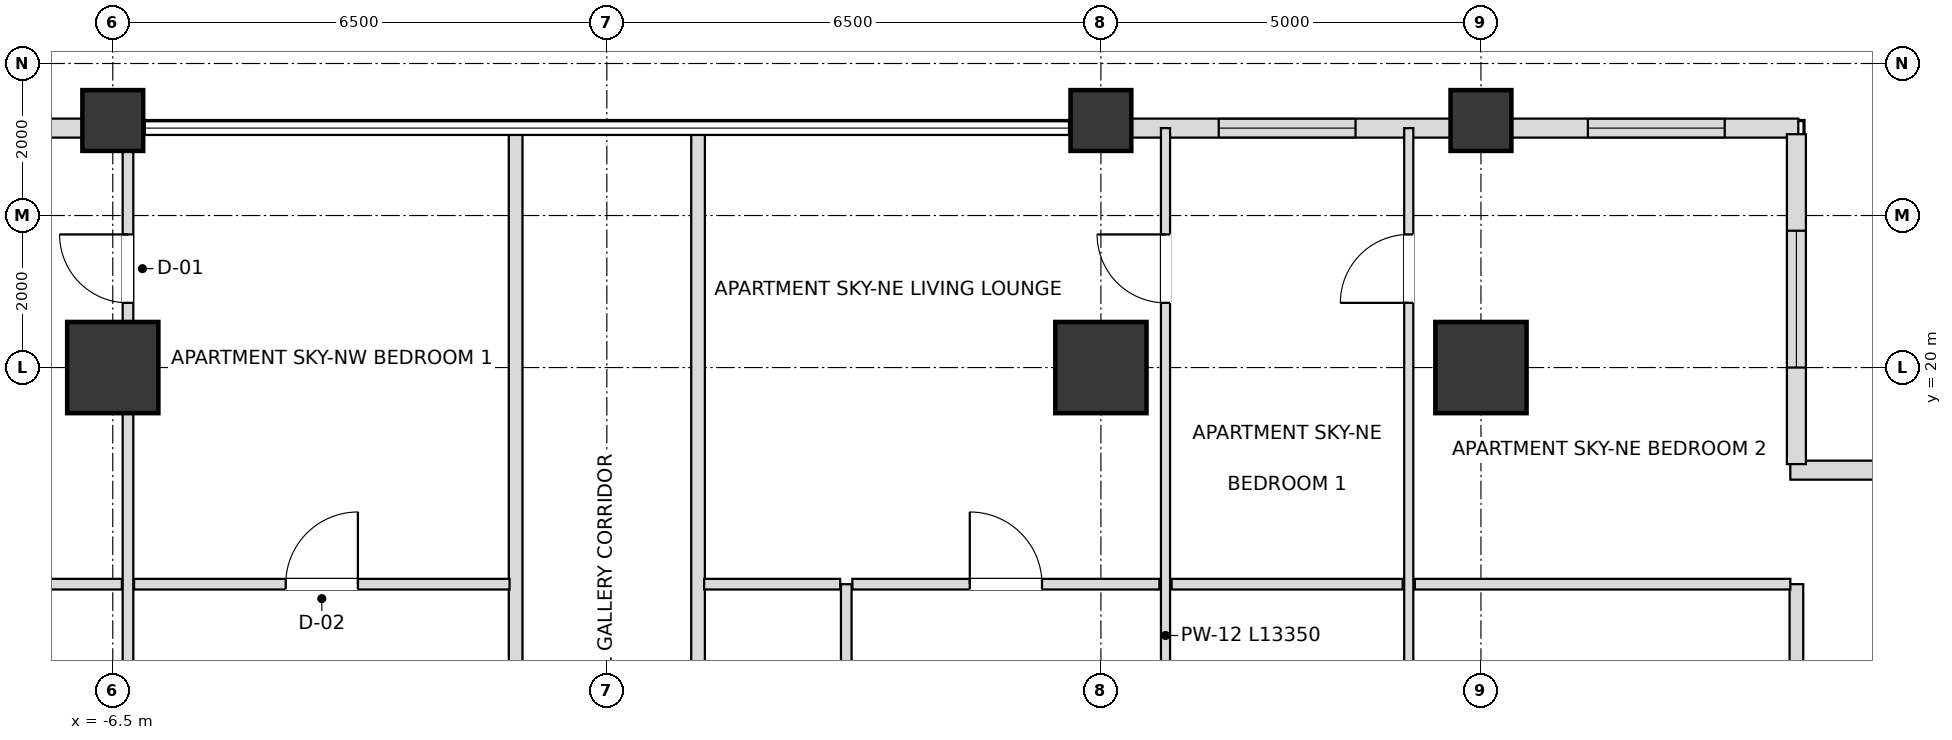
"""IFC4 building model, lengths in metres.
Left out: names, types, materials, properties, quantities, classifications, styles, units other than length and angle.
Written with IfcOpenShell. Run it as: python <this file> out.ifc"""

import sys

from ifc_helpers import new_model, si_unit, direction, frame, frame_2d, origin, origin_2d, place, context, subcontext, project, spatial, rectangle, extrude, element, fill, save


model = new_model("IFC4")
c1 = context("Model", 3, precision=1e-05, world=origin(), true_north=direction((0.0, 1.0)))
c2 = subcontext(c1, "Body", "Model", "MODEL_VIEW")
j1 = project(units=[si_unit("LENGTHUNIT", "METRE"), si_unit("PLANEANGLEUNIT", "RADIAN")], contexts=[c1])
p1 = place(None, origin())
s1 = spatial("IfcSite", under=j1, at=p1, CompositionType="ELEMENT")
p2 = place(p1, origin())
s2 = spatial("IfcBuilding", under=s1, at=p2, CompositionType="ELEMENT")
p3 = place(p2, frame((0.0, 0.0, 125.1)))
s3 = spatial("IfcBuildingStorey", under=s2, at=p3, CompositionType="ELEMENT", Elevation=125.1)
for number, where, z_axis, x_axis in (
    (1, (11.5, 20.0, 0.0), (0.0, 0.0, 1.0), (1.0, 0.0, 0.0)),
    (2, (6.5, 20.0, 0.0), (0.0, 0.0, 1.0), (1.0, 0.0, 0.0)),
    (3, (-6.5, 20.0, 0.0), (0.0, 0.0, 1.0), (1.0, 0.0, 0.0)),
):
    element("IfcColumn", number, at=place(p3, frame(where, z_axis=z_axis, x_axis=x_axis)), inside=s3, PredefinedType="USERDEFINED", context=c2, shape_type="SweptSolid", body=[
        extrude(rectangle(XDim=1.2, YDim=1.2, at=origin_2d()), origin(), (0.0, 0.0, 1.0), 4.5),
    ])
for number, where, z_axis, x_axis in (
    (4, (-6.5, 23.25, 0.0), (0.0, 0.0, 1.0), (1.0, 0.0, 0.0)),
    (5, (6.5, 23.25, 0.0), (0.0, 0.0, 1.0), (1.0, 0.0, 0.0)),
    (6, (11.5, 23.25, 0.0), (0.0, 0.0, 1.0), (1.0, 0.0, 0.0)),
):
    element("IfcColumn", number, at=place(p3, frame(where, z_axis=z_axis, x_axis=x_axis)), inside=s3, PredefinedType="COLUMN", context=c2, shape_type="SweptSolid", body=[
        extrude(rectangle(XDim=0.8, YDim=0.8, at=origin_2d()), origin(), (0.0, 0.0, 1.0), 4.5),
    ])
p4 = place(p3, frame((15.675, 23.15, 0.0), z_axis=(0.0, 0.0, 1.0), x_axis=(-1.0, 0.0, 0.0)))
e7 = element("IfcWall", 7, at=p4, inside=s3, PredefinedType="SOLIDWALL", context=c2, shape_type="SweptSolid", body=[
    extrude(rectangle(XDim=3.78, YDim=0.25, at=frame_2d((1.89, 0.0))), origin(), (0.0, 0.0, 1.0), 3.636),
])
p5 = place(p4, frame((0.968, 0.0, 0.72)))
e8 = element("IfcOpeningElement", 8, at=p5, cuts=e7, PredefinedType="OPENING", context=c2, shape_type="SweptSolid", body=[
    extrude(rectangle(XDim=1.8, YDim=1.68, at=frame_2d((0.9, 0.84))), frame((0.0, 0.135, 0.0), z_axis=(0.0, -1.0, 0.0), x_axis=(1.0, 0.0, 0.0)), (0.0, 0.0, 1.0), 0.27),
])
p6 = place(p3, frame((11.105, 23.15, 0.0), z_axis=(0.0, 0.0, 1.0), x_axis=(-1.0, 0.0, 0.0)))
e9 = element("IfcWall", 9, at=p6, inside=s3, PredefinedType="SOLIDWALL", context=c2, shape_type="SweptSolid", body=[
    extrude(rectangle(XDim=4.21, YDim=0.25, at=frame_2d((2.105, 0.0))), origin(), (0.0, 0.0, 1.0), 3.636),
])
p7 = place(p6, frame((1.255, 0.0, 0.72)))
e10 = element("IfcOpeningElement", 10, at=p7, cuts=e9, PredefinedType="OPENING", context=c2, shape_type="SweptSolid", body=[
    extrude(rectangle(XDim=1.8, YDim=1.68, at=frame_2d((0.9, 0.84))), frame((0.0, 0.135, 0.0), z_axis=(0.0, -1.0, 0.0), x_axis=(1.0, 0.0, 0.0)), (0.0, 0.0, 1.0), 0.27),
])
p8 = place(p3, frame((-6.895, 23.15, 0.0), z_axis=(0.0, 0.0, 1.0), x_axis=(-1.0, 0.0, 0.0)))
e11 = element("IfcWall", 11, at=p8, inside=s3, PredefinedType="SOLIDWALL", context=c2, shape_type="SweptSolid", body=[
    extrude(rectangle(XDim=4.21, YDim=0.25, at=frame_2d((2.105, 0.0))), origin(), (0.0, 0.0, 1.0), 3.636),
])
p9 = place(p8, frame((1.205, 0.0, 0.72)))
e12 = element("IfcOpeningElement", 12, at=p9, cuts=e11, PredefinedType="OPENING", context=c2, shape_type="SweptSolid", body=[
    extrude(rectangle(XDim=1.8, YDim=1.68, at=frame_2d((0.9, 0.84))), frame((0.0, 0.135, 0.0), z_axis=(0.0, -1.0, 0.0), x_axis=(1.0, 0.0, 0.0)), (0.0, 0.0, 1.0), 0.27),
])
p10 = place(p3, frame((20.23, 18.65, 0.0), z_axis=(0.0, 0.0, 1.0), x_axis=(-1.0, 0.0, 0.0)))
e13 = element("IfcWall", 13, at=p10, inside=s3, PredefinedType="SOLIDWALL", context=c2, shape_type="SweptSolid", body=[
    extrude(rectangle(XDim=4.66, YDim=0.25, at=frame_2d((2.33, 0.0))), origin(), (0.0, 0.0, 1.0), 3.636),
])
p11 = place(p10, frame((1.43, 0.0, 0.72)))
e14 = element("IfcOpeningElement", 14, at=p11, cuts=e13, PredefinedType="OPENING", context=c2, shape_type="SweptSolid", body=[
    extrude(rectangle(XDim=1.8, YDim=1.68, at=frame_2d((0.9, 0.84))), frame((0.0, 0.135, 0.0), z_axis=(0.0, -1.0, 0.0), x_axis=(1.0, 0.0, 0.0)), (0.0, 0.0, 1.0), 0.27),
])
p12 = place(p3, frame((15.65, 18.73, 0.0), z_axis=(0.0, 0.0, 1.0), x_axis=(0.0, 1.0, 0.0)))
e15 = element("IfcWall", 15, at=p12, inside=s3, PredefinedType="SOLIDWALL", context=c2, shape_type="SweptSolid", body=[
    extrude(rectangle(XDim=4.34, YDim=0.25, at=frame_2d((2.17, 0.0))), origin(), (0.0, 0.0, 1.0), 3.636),
])
p13 = place(p12, frame((1.27, 0.0, 0.72)))
e16 = element("IfcOpeningElement", 16, at=p13, cuts=e15, PredefinedType="OPENING", context=c2, shape_type="SweptSolid", body=[
    extrude(rectangle(XDim=1.8, YDim=1.68, at=frame_2d((0.9, 0.84))), frame((0.0, 0.135, 0.0), z_axis=(0.0, -1.0, 0.0), x_axis=(1.0, 0.0, 0.0)), (0.0, 0.0, 1.0), 0.27),
])
p14 = place(p3, frame((-6.3, 9.8, 0.0), z_axis=(0.0, 0.0, 1.0), x_axis=(0.0, 1.0, 0.0)))
e17 = element("IfcWall", 17, at=p14, inside=s3, PredefinedType="PARTITIONING", context=c2, shape_type="SweptSolid", body=[
    extrude(rectangle(XDim=13.35, YDim=0.14, at=frame_2d((6.675, 0.0))), origin(), (0.0, 0.0, 1.0), 3.716),
])
p15 = place(p14, frame((11.051, 0.0, 0.0)))
e18 = element("IfcOpeningElement", 18, at=p15, cuts=e17, PredefinedType="OPENING", context=c2, shape_type="SweptSolid", body=[
    extrude(rectangle(XDim=0.9, YDim=2.1, at=frame_2d((0.45, 1.05))), frame((0.0, 0.08, 0.0), z_axis=(0.0, -1.0, 0.0), x_axis=(1.0, 0.0, 0.0)), (0.0, 0.0, 1.0), 0.16),
])
for number, where, z_axis, x_axis in (
    (19, (-1.2, 9.8, 0.0), (0.0, 0.0, 1.0), (0.0, 1.0, 0.0)),
    (20, (1.2, 9.8, 0.0), (0.0, 0.0, 1.0), (0.0, 1.0, 0.0)),
):
    element("IfcWall", number, at=place(p3, frame(where, z_axis=z_axis, x_axis=x_axis)), inside=s3, PredefinedType="PARTITIONING", context=c2, shape_type="SweptSolid", body=[
        extrude(rectangle(XDim=13.35, YDim=0.18, at=frame_2d((6.675, 0.0))), origin(), (0.0, 0.0, 1.0), 3.716),
    ])
p16 = place(p3, frame((3.15, 9.8, 0.0), z_axis=(0.0, 0.0, 1.0), x_axis=(0.0, 1.0, 0.0)))
e21 = element("IfcWall", 21, at=p16, inside=s3, PredefinedType="PARTITIONING", context=c2, shape_type="SweptSolid", body=[
    extrude(rectangle(XDim=7.35, YDim=0.14, at=frame_2d((3.675, 0.0))), origin(), (0.0, 0.0, 1.0), 4.28),
])
p17 = place(p16, frame((3.22, 0.0, 0.0)))
e22 = element("IfcOpeningElement", 22, at=p17, cuts=e21, PredefinedType="OPENING", context=c2, shape_type="SweptSolid", body=[
    extrude(rectangle(XDim=0.9, YDim=2.1, at=frame_2d((0.45, 1.05))), frame((0.0, 0.08, 0.0), z_axis=(0.0, -1.0, 0.0), x_axis=(1.0, 0.0, 0.0)), (0.0, 0.0, 1.0), 0.16),
])
p18 = place(p3, frame((7.35, 9.8, 0.0), z_axis=(0.0, 0.0, 1.0), x_axis=(0.0, 1.0, 0.0)))
e23 = element("IfcWall", 23, at=p18, inside=s3, PredefinedType="PARTITIONING", context=c2, shape_type="SweptSolid", body=[
    extrude(rectangle(XDim=13.35, YDim=0.12, at=frame_2d((6.675, 0.0))), origin(), (0.0, 0.0, 1.0), 3.716),
])
p19 = place(p18, frame((3.195, 0.0, 0.0)))
e24 = element("IfcOpeningElement", 24, at=p19, cuts=e23, PredefinedType="OPENING", context=c2, shape_type="SweptSolid", body=[
    extrude(rectangle(XDim=0.95, YDim=2.1, at=frame_2d((0.475, 1.05))), frame((0.0, 0.07, 0.0), z_axis=(0.0, -1.0, 0.0), x_axis=(1.0, 0.0, 0.0)), (0.0, 0.0, 1.0), 0.14),
])
p20 = place(p18, frame((11.051, 0.0, 0.0)))
e25 = element("IfcOpeningElement", 25, at=p20, cuts=e23, PredefinedType="OPENING", context=c2, shape_type="SweptSolid", body=[
    extrude(rectangle(XDim=0.9, YDim=2.1, at=frame_2d((0.45, 1.05))), frame((0.0, 0.07, 0.0), z_axis=(0.0, -1.0, 0.0), x_axis=(1.0, 0.0, 0.0)), (0.0, 0.0, 1.0), 0.14),
])
p21 = place(p3, frame((10.55, 9.8, 0.0), z_axis=(0.0, 0.0, 1.0), x_axis=(0.0, 1.0, 0.0)))
e26 = element("IfcWall", 26, at=p21, inside=s3, PredefinedType="PARTITIONING", context=c2, shape_type="SweptSolid", body=[
    extrude(rectangle(XDim=13.35, YDim=0.12, at=frame_2d((6.675, 0.0))), origin(), (0.0, 0.0, 1.0), 3.716),
])
p22 = place(p21, frame((3.713, 0.0, 0.0)))
e27 = element("IfcOpeningElement", 27, at=p22, cuts=e26, PredefinedType="OPENING", context=c2, shape_type="SweptSolid", body=[
    extrude(rectangle(XDim=0.95, YDim=2.1, at=frame_2d((0.475, 1.05))), frame((0.0, 0.07, 0.0), z_axis=(0.0, -1.0, 0.0), x_axis=(1.0, 0.0, 0.0)), (0.0, 0.0, 1.0), 0.14),
])
p23 = place(p21, frame((11.051, 0.0, 0.0)))
e28 = element("IfcOpeningElement", 28, at=p23, cuts=e26, PredefinedType="OPENING", context=c2, shape_type="SweptSolid", body=[
    extrude(rectangle(XDim=0.9, YDim=2.1, at=frame_2d((0.45, 1.05))), frame((0.0, 0.07, 0.0), z_axis=(0.0, -1.0, 0.0), x_axis=(1.0, 0.0, 0.0)), (0.0, 0.0, 1.0), 0.14),
])
p24 = place(p3, frame((15.65, 9.8, 0.0), z_axis=(0.0, 0.0, 1.0), x_axis=(0.0, 1.0, 0.0)))
e29 = element("IfcWall", 29, at=p24, inside=s3, PredefinedType="PARTITIONING", context=c2, shape_type="SweptSolid", body=[
    extrude(rectangle(XDim=7.35, YDim=0.18, at=frame_2d((3.675, 0.0))), origin(), (0.0, 0.0, 1.0), 3.636),
])
p25 = place(p3, frame((-8.17, 17.15, 0.0), z_axis=(0.0, 0.0, 1.0), x_axis=(1.0, 0.0, 0.0)))
e30 = element("IfcWall", 30, at=p25, inside=s3, PredefinedType="PARTITIONING", context=c2, shape_type="SweptSolid", body=[
    extrude(rectangle(XDim=1.79, YDim=0.14, at=frame_2d((0.895, 0.0))), origin(), (0.0, 0.0, 1.0), 3.716),
])
p26 = place(p3, frame((-6.22, 17.15, 0.0), z_axis=(0.0, 0.0, 1.0), x_axis=(1.0, 0.0, 0.0)))
e31 = element("IfcWall", 31, at=p26, inside=s3, PredefinedType="PARTITIONING", context=c2, shape_type="SweptSolid", body=[
    extrude(rectangle(XDim=4.94, YDim=0.14, at=frame_2d((2.47, 0.0))), origin(), (0.0, 0.0, 1.0), 4.28),
])
p27 = place(p26, frame((1.995, 0.0, 0.0)))
e32 = element("IfcOpeningElement", 32, at=p27, cuts=e31, PredefinedType="OPENING", context=c2, shape_type="SweptSolid", body=[
    extrude(rectangle(XDim=0.95, YDim=2.1, at=frame_2d((0.475, 1.05))), frame((0.0, 0.08, 0.0), z_axis=(0.0, -1.0, 0.0), x_axis=(1.0, 0.0, 0.0)), (0.0, 0.0, 1.0), 0.16),
])
p28 = place(p3, frame((1.28, 17.15, 0.0), z_axis=(0.0, 0.0, 1.0), x_axis=(1.0, 0.0, 0.0)))
e33 = element("IfcWall", 33, at=p28, inside=s3, PredefinedType="PARTITIONING", context=c2, shape_type="SweptSolid", body=[
    extrude(rectangle(XDim=1.79, YDim=0.14, at=frame_2d((0.895, 0.0))), origin(), (0.0, 0.0, 1.0), 4.28),
])
p29 = place(p3, frame((3.23, 17.15, 0.0), z_axis=(0.0, 0.0, 1.0), x_axis=(1.0, 0.0, 0.0)))
e34 = element("IfcWall", 34, at=p29, inside=s3, PredefinedType="PARTITIONING", context=c2, shape_type="SweptSolid", body=[
    extrude(rectangle(XDim=4.04, YDim=0.14, at=frame_2d((2.02, 0.0))), origin(), (0.0, 0.0, 1.0), 3.716),
])
p30 = place(p29, frame((1.545, 0.0, 0.0)))
e35 = element("IfcOpeningElement", 35, at=p30, cuts=e34, PredefinedType="OPENING", context=c2, shape_type="SweptSolid", body=[
    extrude(rectangle(XDim=0.95, YDim=2.1, at=frame_2d((0.475, 1.05))), frame((0.0, 0.08, 0.0), z_axis=(0.0, -1.0, 0.0), x_axis=(1.0, 0.0, 0.0)), (0.0, 0.0, 1.0), 0.16),
])
p31 = place(p3, frame((7.43, 17.15, 0.0), z_axis=(0.0, 0.0, 1.0), x_axis=(1.0, 0.0, 0.0)))
e36 = element("IfcWall", 36, at=p31, inside=s3, PredefinedType="PARTITIONING", context=c2, shape_type="SweptSolid", body=[
    extrude(rectangle(XDim=3.04, YDim=0.14, at=frame_2d((1.52, 0.0))), origin(), (0.0, 0.0, 1.0), 4.28),
])
p32 = place(p3, frame((10.63, 17.15, 0.0), z_axis=(0.0, 0.0, 1.0), x_axis=(1.0, 0.0, 0.0)))
e37 = element("IfcWall", 37, at=p32, inside=s3, PredefinedType="PARTITIONING", context=c2, shape_type="SweptSolid", body=[
    extrude(rectangle(XDim=4.94, YDim=0.14, at=frame_2d((2.47, 0.0))), origin(), (0.0, 0.0, 1.0), 3.636),
])
p33 = place(p5, origin())
e38 = element("IfcWindow", 38, at=p33, inside=s3, PartitioningType="SINGLE_PANEL", PredefinedType="WINDOW", context=c2, shape_type="SweptSolid", body=[
    extrude(rectangle(XDim=1.8, YDim=1.68, at=frame_2d((0.9, 0.84))), frame((0.0, 0.03, 0.0), z_axis=(0.0, -1.0, 0.0), x_axis=(1.0, 0.0, 0.0)), (0.0, 0.0, 1.0), 0.06),
])
fill(e8, e38)
p34 = place(p7, origin())
e39 = element("IfcWindow", 39, at=p34, inside=s3, PartitioningType="SINGLE_PANEL", PredefinedType="WINDOW", context=c2, shape_type="SweptSolid", body=[
    extrude(rectangle(XDim=1.8, YDim=1.68, at=frame_2d((0.9, 0.84))), frame((0.0, 0.03, 0.0), z_axis=(0.0, -1.0, 0.0), x_axis=(1.0, 0.0, 0.0)), (0.0, 0.0, 1.0), 0.06),
])
fill(e10, e39)
p35 = place(p13, origin())
e40 = element("IfcWindow", 40, at=p35, inside=s3, PartitioningType="SINGLE_PANEL", PredefinedType="WINDOW", context=c2, shape_type="SweptSolid", body=[
    extrude(rectangle(XDim=1.8, YDim=1.68, at=frame_2d((0.9, 0.84))), frame((0.0, 0.03, 0.0), z_axis=(0.0, -1.0, 0.0), x_axis=(1.0, 0.0, 0.0)), (0.0, 0.0, 1.0), 0.06),
])
fill(e16, e40)
p36 = place(p27, origin())
e41 = element("IfcDoor", 41, at=p36, inside=s3, OperationType="SINGLE_SWING_RIGHT", PredefinedType="DOOR", context=c2, shape_type="SweptSolid", body=[
    extrude(rectangle(XDim=0.95, YDim=2.1, at=frame_2d((0.475, 1.05))), frame((0.0, 0.025, 0.0), z_axis=(0.0, -1.0, 0.0), x_axis=(1.0, 0.0, 0.0)), (0.0, 0.0, 1.0), 0.05),
])
fill(e32, e41)
p37 = place(p15, origin())
e42 = element("IfcDoor", 42, at=p37, inside=s3, OperationType="SINGLE_SWING_RIGHT", PredefinedType="DOOR", context=c2, shape_type="SweptSolid", body=[
    extrude(rectangle(XDim=0.9, YDim=2.1, at=frame_2d((0.45, 1.05))), frame((0.0, 0.025, 0.0), z_axis=(0.0, -1.0, 0.0), x_axis=(1.0, 0.0, 0.0)), (0.0, 0.0, 1.0), 0.05),
])
fill(e18, e42)
p38 = place(p30, origin())
e43 = element("IfcDoor", 43, at=p38, inside=s3, OperationType="SINGLE_SWING_LEFT", PredefinedType="DOOR", context=c2, shape_type="SweptSolid", body=[
    extrude(rectangle(XDim=0.95, YDim=2.1, at=frame_2d((0.475, 1.05))), frame((0.0, 0.025, 0.0), z_axis=(0.0, -1.0, 0.0), x_axis=(1.0, 0.0, 0.0)), (0.0, 0.0, 1.0), 0.05),
])
fill(e35, e43)
p39 = place(p20, origin())
e44 = element("IfcDoor", 44, at=p39, inside=s3, OperationType="SINGLE_SWING_RIGHT", PredefinedType="DOOR", context=c2, shape_type="SweptSolid", body=[
    extrude(rectangle(XDim=0.9, YDim=2.1, at=frame_2d((0.45, 1.05))), frame((0.0, 0.025, 0.0), z_axis=(0.0, -1.0, 0.0), x_axis=(1.0, 0.0, 0.0)), (0.0, 0.0, 1.0), 0.05),
])
fill(e25, e44)
p40 = place(p23, origin())
e45 = element("IfcDoor", 45, at=p40, inside=s3, OperationType="SINGLE_SWING_LEFT", PredefinedType="DOOR", context=c2, shape_type="SweptSolid", body=[
    extrude(rectangle(XDim=0.9, YDim=2.1, at=frame_2d((0.45, 1.05))), frame((0.0, 0.025, 0.0), z_axis=(0.0, -1.0, 0.0), x_axis=(1.0, 0.0, 0.0)), (0.0, 0.0, 1.0), 0.05),
])
fill(e28, e45)
save(model, sys.argv[1])
